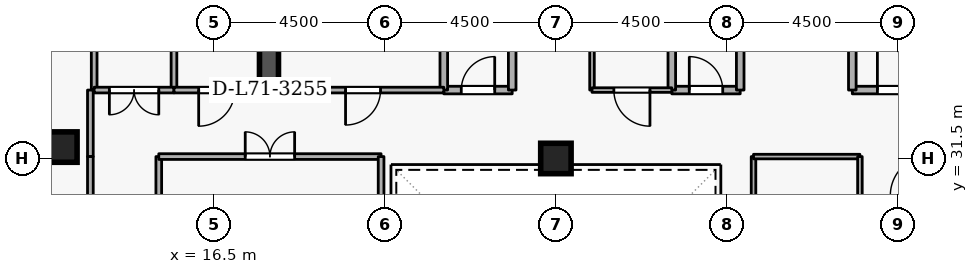
"""IFC4 building model, lengths in metres.
Left out: names, types, materials, properties, quantities, classifications, styles, units other than length and angle.
Written with IfcOpenShell. Run it as: python <this file> out.ifc"""

import sys

from ifc_helpers import new_model, si_unit, direction, frame, frame_2d, origin, origin_2d, place, context, subcontext, project, spatial, rectangle, extrude, element, fill, save


model = new_model("IFC4")
c1 = context("Model", 3, precision=1e-05, world=origin(), true_north=direction((0.0, 1.0)))
c2 = subcontext(c1, "Body", "Model", "MODEL_VIEW")
j1 = project(units=[si_unit("LENGTHUNIT", "METRE"), si_unit("PLANEANGLEUNIT", "RADIAN")], contexts=[c1])
p1 = place(None, origin())
s1 = spatial("IfcSite", under=j1, at=p1, CompositionType="ELEMENT")
p2 = place(p1, origin())
s2 = spatial("IfcBuilding", under=s1, at=p2, CompositionType="ELEMENT")
p3 = place(p2, frame((0.0, 0.0, 265.5)))
s3 = spatial("IfcBuildingStorey", under=s2, at=p3, CompositionType="ELEMENT", Elevation=265.5)
p4 = place(p3, frame((17.95, 33.1, 0.0), z_axis=(0.0, 0.0, 1.0), x_axis=(0.0, 1.0, 0.0)))
e1 = element("IfcWall", 1, at=p4, inside=s3, PredefinedType="SHEAR", context=c2, shape_type="SweptSolid", body=[
    extrude(rectangle(XDim=5.8, YDim=0.5, at=frame_2d((2.9, 0.0))), origin(), (0.0, 0.0, 1.0), 3.6),
])
for number, where, z_axis, x_axis in (
    (2, (12.5, 31.8, 0.0), (0.0, 0.0, 1.0), (1.0, 0.0, 0.0)),
    (3, (25.5, 31.5, 0.0), (0.0, 0.0, 1.0), (1.0, 0.0, 0.0)),
):
    element("IfcColumn", number, at=place(p3, frame(where, z_axis=z_axis, x_axis=x_axis)), inside=s3, PredefinedType="COLUMN", context=c2, shape_type="SweptSolid", body=[
        extrude(rectangle(XDim=0.8, YDim=0.8, at=origin_2d()), origin(), (0.0, 0.0, 1.0), 3.6),
    ])
p5 = place(p3, frame((33.3, 33.3, 0.0), z_axis=(0.0, 0.0, 1.0), x_axis=(1.0, 0.0, 0.0)))
e4 = element("IfcWall", 4, at=p5, inside=s3, PredefinedType="STANDARD", context=c2, shape_type="SweptSolid", body=[
    extrude(rectangle(XDim=2.5, YDim=0.2, at=frame_2d((1.25, 0.0))), origin(), (0.0, 0.0, 1.0), 3.34),
])
p6 = place(p5, frame((0.66, 0.0, 0.0)))
e5 = element("IfcOpeningElement", 5, at=p6, cuts=e4, PredefinedType="OPENING", context=c2, shape_type="SweptSolid", body=[
    extrude(rectangle(XDim=1.15, YDim=2.1, at=frame_2d((0.575, 1.05))), frame((0.0, 0.11, 0.0), z_axis=(0.0, -1.0, 0.0), x_axis=(1.0, 0.0, 0.0)), (0.0, 0.0, 1.0), 0.22),
])
p7 = place(p3, frame((33.3, 35.6, 0.0), z_axis=(0.0, 0.0, 1.0), x_axis=(0.0, -1.0, 0.0)))
e6 = element("IfcWall", 6, at=p7, inside=s3, PredefinedType="STANDARD", context=c2, shape_type="SweptSolid", body=[
    extrude(rectangle(XDim=2.3, YDim=0.2, at=frame_2d((1.15, 0.0))), origin(), (0.0, 0.0, 1.0), 2.545),
])
p8 = place(p3, frame((22.55, 33.3, 0.0), z_axis=(0.0, 0.0, 1.0), x_axis=(1.0, 0.0, 0.0)))
e7 = element("IfcWall", 7, at=p8, inside=s3, PredefinedType="STANDARD", context=c2, shape_type="SweptSolid", body=[
    extrude(rectangle(XDim=1.8, YDim=0.2, at=frame_2d((0.9, 0.0))), origin(), (0.0, 0.0, 1.0), 3.34),
])
p9 = place(p8, frame((0.46, 0.0, 0.0)))
e8 = element("IfcOpeningElement", 8, at=p9, cuts=e7, PredefinedType="OPENING", context=c2, shape_type="SweptSolid", body=[
    extrude(rectangle(XDim=0.88, YDim=2.04, at=frame_2d((0.44, 1.02))), frame((0.0, 0.11, 0.0), z_axis=(0.0, -1.0, 0.0), x_axis=(1.0, 0.0, 0.0)), (0.0, 0.0, 1.0), 0.22),
])
for number, where, z_axis, x_axis in (
    (9, (24.35, 33.3, 0.0), (0.0, 0.0, 1.0), (0.0, 1.0, 0.0)),
    (10, (22.55, 35.35, 0.0), (0.0, 0.0, 1.0), (0.0, -1.0, 0.0)),
):
    element("IfcWall", number, at=place(p3, frame(where, z_axis=z_axis, x_axis=x_axis)), inside=s3, PredefinedType="STANDARD", context=c2, shape_type="SweptSolid", body=[
        extrude(rectangle(XDim=2.05, YDim=0.2, at=frame_2d((1.025, 0.0))), origin(), (0.0, 0.0, 1.0), 3.34),
    ])
p10 = place(p3, frame((28.55, 33.3, 0.0), z_axis=(0.0, 0.0, 1.0), x_axis=(1.0, 0.0, 0.0)))
e11 = element("IfcWall", 11, at=p10, inside=s3, PredefinedType="STANDARD", context=c2, shape_type="SweptSolid", body=[
    extrude(rectangle(XDim=1.8, YDim=0.2, at=frame_2d((0.9, 0.0))), origin(), (0.0, 0.0, 1.0), 3.34),
])
p11 = place(p10, frame((0.46, 0.0, 0.0)))
e12 = element("IfcOpeningElement", 12, at=p11, cuts=e11, PredefinedType="OPENING", context=c2, shape_type="SweptSolid", body=[
    extrude(rectangle(XDim=0.88, YDim=2.04, at=frame_2d((0.44, 1.02))), frame((0.0, 0.11, 0.0), z_axis=(0.0, -1.0, 0.0), x_axis=(1.0, 0.0, 0.0)), (0.0, 0.0, 1.0), 0.22),
])
for number, where, z_axis, x_axis in (
    (13, (30.35, 33.3, 0.0), (0.0, 0.0, 1.0), (0.0, 1.0, 0.0)),
    (14, (28.55, 35.35, 0.0), (0.0, 0.0, 1.0), (0.0, -1.0, 0.0)),
):
    element("IfcWall", number, at=place(p3, frame(where, z_axis=z_axis, x_axis=x_axis)), inside=s3, PredefinedType="STANDARD", context=c2, shape_type="SweptSolid", body=[
        extrude(rectangle(XDim=2.05, YDim=0.2, at=frame_2d((1.025, 0.0))), origin(), (0.0, 0.0, 1.0), 3.34),
    ])
p12 = place(p3, frame((22.55, 33.3, 0.0), z_axis=(0.0, 0.0, 1.0), x_axis=(-1.0, 0.0, 0.0)))
e15 = element("IfcWall", 15, at=p12, inside=s3, PredefinedType="PARTITIONING", context=c2, shape_type="SweptSolid", body=[
    extrude(rectangle(XDim=4.25, YDim=0.15, at=frame_2d((2.125, 0.0))), origin(), (0.0, 0.0, 1.0), 3.34),
])
p13 = place(p12, frame((1.665, 0.0, 0.0)))
e16 = element("IfcOpeningElement", 16, at=p13, cuts=e15, PredefinedType="OPENING", context=c2, shape_type="SweptSolid", body=[
    extrude(rectangle(XDim=0.92, YDim=2.08, at=frame_2d((0.46, 1.04))), frame((0.0, 0.085, 0.0), z_axis=(0.0, -1.0, 0.0), x_axis=(1.0, 0.0, 0.0)), (0.0, 0.0, 1.0), 0.17),
])
p14 = place(p3, frame((26.45, 33.3, 0.0), z_axis=(0.0, 0.0, 1.0), x_axis=(0.0, 1.0, 0.0)))
e17 = element("IfcWall", 17, at=p14, inside=s3, PredefinedType="PARTITIONING", context=c2, shape_type="SweptSolid", body=[
    extrude(rectangle(XDim=2.05, YDim=0.12, at=frame_2d((1.025, 0.0))), origin(), (0.0, 0.0, 1.0), 3.34),
])
p15 = place(p3, frame((28.55, 33.3, 0.0), z_axis=(0.0, 0.0, 1.0), x_axis=(-1.0, 0.0, 0.0)))
e18 = element("IfcWall", 18, at=p15, inside=s3, PredefinedType="PARTITIONING", context=c2, shape_type="SweptSolid", body=[
    extrude(rectangle(XDim=2.1, YDim=0.12, at=frame_2d((1.05, 0.0))), origin(), (0.0, 0.0, 1.0), 3.34),
])
p16 = place(p15, frame((0.575, 0.0, 0.0)))
e19 = element("IfcOpeningElement", 19, at=p16, cuts=e18, PredefinedType="OPENING", context=c2, shape_type="SweptSolid", body=[
    extrude(rectangle(XDim=0.95, YDim=2.1, at=frame_2d((0.475, 1.05))), frame((0.0, 0.07, 0.0), z_axis=(0.0, -1.0, 0.0), x_axis=(1.0, 0.0, 0.0)), (0.0, 0.0, 1.0), 0.14),
])
for number, where, z_axis, x_axis in (
    (20, (13.35, 33.3, 0.0), (0.0, 0.0, 1.0), (0.0, 1.0, 0.0)),
    (21, (15.45, 44.72, 0.0), (0.0, 0.0, 1.0), (0.0, -1.0, 0.0)),
):
    element("IfcWall", number, at=place(p3, frame(where, z_axis=z_axis, x_axis=x_axis)), inside=s3, PredefinedType="PARTITIONING", context=c2, shape_type="SweptSolid", body=[
        extrude(rectangle(XDim=11.42, YDim=0.15, at=frame_2d((5.71, 0.0))), origin(), (0.0, 0.0, 1.0), 3.34),
    ])
p17 = place(p3, frame((15.45, 33.3, 0.0), z_axis=(0.0, 0.0, 1.0), x_axis=(-1.0, 0.0, 0.0)))
e22 = element("IfcWall", 22, at=p17, inside=s3, PredefinedType="PARTITIONING", context=c2, shape_type="SweptSolid", body=[
    extrude(rectangle(XDim=2.1, YDim=0.15, at=frame_2d((1.05, 0.0))), origin(), (0.0, 0.0, 1.0), 3.34),
])
p18 = place(p17, frame((0.4, 0.0, 0.0)))
e23 = element("IfcOpeningElement", 23, at=p18, cuts=e22, PredefinedType="OPENING", context=c2, shape_type="SweptSolid", body=[
    extrude(rectangle(XDim=1.3, YDim=2.12, at=frame_2d((0.65, 1.06))), frame((0.0, 0.085, 0.0), z_axis=(0.0, -1.0, 0.0), x_axis=(1.0, 0.0, 0.0)), (0.0, 0.0, 1.0), 0.17),
])
p19 = place(p3, frame((17.7, 33.3, 0.0), z_axis=(0.0, 0.0, 1.0), x_axis=(-1.0, 0.0, 0.0)))
e24 = element("IfcWall", 24, at=p19, inside=s3, PredefinedType="PARTITIONING", context=c2, shape_type="SweptSolid", body=[
    extrude(rectangle(XDim=2.25, YDim=0.15, at=frame_2d((1.125, 0.0))), origin(), (0.0, 0.0, 1.0), 3.34),
])
p20 = place(p19, frame((0.65, 0.0, 0.0)))
e25 = element("IfcOpeningElement", 25, at=p20, cuts=e24, PredefinedType="OPENING", context=c2, shape_type="SweptSolid", body=[
    extrude(rectangle(XDim=0.95, YDim=2.1, at=frame_2d((0.475, 1.05))), frame((0.0, 0.085, 0.0), z_axis=(0.0, -1.0, 0.0), x_axis=(1.0, 0.0, 0.0)), (0.0, 0.0, 1.0), 0.17),
])
p21 = place(p3, frame((13.25, 33.3, 0.0), z_axis=(0.0, 0.0, 1.0), x_axis=(0.0, -1.0, 0.0)))
e26 = element("IfcWall", 26, at=p21, inside=s3, PredefinedType="PARTITIONING", context=c2, shape_type="SweptSolid", body=[
    extrude(rectangle(XDim=1.75, YDim=0.15, at=frame_2d((0.875, 0.0))), origin(), (0.0, 0.0, 1.0), 3.34),
])
p22 = place(p3, frame((13.25, 31.55, 0.0), z_axis=(0.0, 0.0, 1.0), x_axis=(0.0, -1.0, 0.0)))
e27 = element("IfcWall", 27, at=p22, inside=s3, PredefinedType="PARTITIONING", context=c2, shape_type="SweptSolid", body=[
    extrude(rectangle(XDim=3.35, YDim=0.15, at=frame_2d((1.675, 0.0))), origin(), (0.0, 0.0, 1.0), 3.34),
])
p23 = place(p22, frame((1.025, 0.0, 0.0)))
e28 = element("IfcOpeningElement", 28, at=p23, cuts=e27, PredefinedType="OPENING", context=c2, shape_type="SweptSolid", body=[
    extrude(rectangle(XDim=1.3, YDim=2.12, at=frame_2d((0.65, 1.06))), frame((0.0, 0.085, 0.0), z_axis=(0.0, -1.0, 0.0), x_axis=(1.0, 0.0, 0.0)), (0.0, 0.0, 1.0), 0.17),
])
p24 = place(p3, frame((15.05, 28.2, 0.0), z_axis=(0.0, 0.0, 1.0), x_axis=(0.0, 1.0, 0.0)))
e29 = element("IfcWall", 29, at=p24, inside=s3, PredefinedType="PARTITIONING", context=c2, shape_type="SweptSolid", body=[
    extrude(rectangle(XDim=3.35, YDim=0.15, at=frame_2d((1.675, 0.0))), origin(), (0.0, 0.0, 1.0), 3.34),
])
p25 = place(p3, frame((15.05, 31.55, 0.0), z_axis=(0.0, 0.0, 1.0), x_axis=(1.0, 0.0, 0.0)))
e30 = element("IfcWall", 30, at=p25, inside=s3, PredefinedType="PARTITIONING", context=c2, shape_type="SweptSolid", body=[
    extrude(rectangle(XDim=5.85, YDim=0.15, at=frame_2d((2.925, 0.0))), origin(), (0.0, 0.0, 1.0), 3.34),
])
p26 = place(p25, frame((2.275, 0.0, 0.0)))
e31 = element("IfcOpeningElement", 31, at=p26, cuts=e30, PredefinedType="OPENING", context=c2, shape_type="SweptSolid", body=[
    extrude(rectangle(XDim=1.3, YDim=2.12, at=frame_2d((0.65, 1.06))), frame((0.0, 0.085, 0.0), z_axis=(0.0, -1.0, 0.0), x_axis=(1.0, 0.0, 0.0)), (0.0, 0.0, 1.0), 0.17),
])
p27 = place(p3, frame((20.9, 31.55, 0.0), z_axis=(0.0, 0.0, 1.0), x_axis=(0.0, -1.0, 0.0)))
e32 = element("IfcWall", 32, at=p27, inside=s3, PredefinedType="PARTITIONING", context=c2, shape_type="SweptSolid", body=[
    extrude(rectangle(XDim=3.35, YDim=0.15, at=frame_2d((1.675, 0.0))), origin(), (0.0, 0.0, 1.0), 3.34),
])
p28 = place(p3, frame((30.7, 27.0, 0.0), z_axis=(0.0, 0.0, 1.0), x_axis=(0.0, 1.0, 0.0)))
e33 = element("IfcWall", 33, at=p28, inside=s3, PredefinedType="PARTITIONING", context=c2, shape_type="SweptSolid", body=[
    extrude(rectangle(XDim=4.55, YDim=0.12, at=frame_2d((2.275, 0.0))), origin(), (0.0, 0.0, 1.0), 3.34),
])
p29 = place(p3, frame((30.7, 31.55, 0.0), z_axis=(0.0, 0.0, 1.0), x_axis=(1.0, 0.0, 0.0)))
e34 = element("IfcWall", 34, at=p29, inside=s3, PredefinedType="PARTITIONING", context=c2, shape_type="SweptSolid", body=[
    extrude(rectangle(XDim=2.8, YDim=0.12, at=frame_2d((1.4, 0.0))), origin(), (0.0, 0.0, 1.0), 3.34),
])
p30 = place(p3, frame((33.5, 31.55, 0.0), z_axis=(0.0, 0.0, 1.0), x_axis=(0.0, -1.0, 0.0)))
e35 = element("IfcWall", 35, at=p30, inside=s3, PredefinedType="PARTITIONING", context=c2, shape_type="SweptSolid", body=[
    extrude(rectangle(XDim=4.55, YDim=0.12, at=frame_2d((2.275, 0.0))), origin(), (0.0, 0.0, 1.0), 3.34),
])
p31 = place(p30, frame((1.8, 0.0, 0.0)))
e36 = element("IfcOpeningElement", 36, at=p31, cuts=e35, PredefinedType="OPENING", context=c2, shape_type="SweptSolid", body=[
    extrude(rectangle(XDim=0.95, YDim=2.1, at=frame_2d((0.475, 1.05))), frame((0.0, 0.07, 0.0), z_axis=(0.0, -1.0, 0.0), x_axis=(1.0, 0.0, 0.0)), (0.0, 0.0, 1.0), 0.14),
])
p32 = place(p6, origin())
e37 = element("IfcDoor", 37, at=p32, inside=s3, OperationType="SINGLE_SWING_LEFT", PredefinedType="DOOR", context=c2, shape_type="SweptSolid", body=[
    extrude(rectangle(XDim=1.15, YDim=2.1, at=frame_2d((0.575, 1.05))), frame((0.0, 0.025, 0.0), z_axis=(0.0, -1.0, 0.0), x_axis=(1.0, 0.0, 0.0)), (0.0, 0.0, 1.0), 0.05),
])
fill(e5, e37)
p33 = place(p9, origin())
e38 = element("IfcDoor", 38, at=p33, inside=s3, OperationType="SINGLE_SWING_RIGHT", PredefinedType="DOOR", context=c2, shape_type="SweptSolid", body=[
    extrude(rectangle(XDim=0.88, YDim=2.04, at=frame_2d((0.44, 1.02))), frame((0.0, 0.025, 0.0), z_axis=(0.0, -1.0, 0.0), x_axis=(1.0, 0.0, 0.0)), (0.0, 0.0, 1.0), 0.05),
])
fill(e8, e38)
p34 = place(p11, origin())
e39 = element("IfcDoor", 39, at=p34, inside=s3, OperationType="SINGLE_SWING_LEFT", PredefinedType="DOOR", context=c2, shape_type="SweptSolid", body=[
    extrude(rectangle(XDim=0.88, YDim=2.04, at=frame_2d((0.44, 1.02))), frame((0.0, 0.025, 0.0), z_axis=(0.0, -1.0, 0.0), x_axis=(1.0, 0.0, 0.0)), (0.0, 0.0, 1.0), 0.05),
])
fill(e12, e39)
p35 = place(p13, origin())
e40 = element("IfcDoor", 40, at=p35, inside=s3, OperationType="SINGLE_SWING_RIGHT", PredefinedType="DOOR", context=c2, shape_type="SweptSolid", body=[
    extrude(rectangle(XDim=0.92, YDim=2.08, at=frame_2d((0.46, 1.04))), frame((0.0, 0.025, 0.0), z_axis=(0.0, -1.0, 0.0), x_axis=(1.0, 0.0, 0.0)), (0.0, 0.0, 1.0), 0.05),
])
fill(e16, e40)
p36 = place(p16, origin())
e41 = element("IfcDoor", 41, at=p36, inside=s3, OperationType="SINGLE_SWING_LEFT", PredefinedType="DOOR", context=c2, shape_type="SweptSolid", body=[
    extrude(rectangle(XDim=0.95, YDim=2.1, at=frame_2d((0.475, 1.05))), frame((0.0, 0.025, 0.0), z_axis=(0.0, -1.0, 0.0), x_axis=(1.0, 0.0, 0.0)), (0.0, 0.0, 1.0), 0.05),
])
fill(e19, e41)
p37 = place(p18, origin())
e42 = element("IfcDoor", 42, at=p37, inside=s3, OperationType="DOUBLE_DOOR_SINGLE_SWING", PredefinedType="DOOR", context=c2, shape_type="SweptSolid", body=[
    extrude(rectangle(XDim=1.3, YDim=2.12, at=frame_2d((0.65, 1.06))), frame((0.0, 0.025, 0.0), z_axis=(0.0, -1.0, 0.0), x_axis=(1.0, 0.0, 0.0)), (0.0, 0.0, 1.0), 0.05),
])
fill(e23, e42)
p38 = place(p20, origin())
e43 = element("IfcDoor", 43, at=p38, inside=s3, OperationType="SINGLE_SWING_RIGHT", PredefinedType="DOOR", context=c2, shape_type="SweptSolid", body=[
    extrude(rectangle(XDim=0.95, YDim=2.1, at=frame_2d((0.475, 1.05))), frame((0.0, 0.025, 0.0), z_axis=(0.0, -1.0, 0.0), x_axis=(1.0, 0.0, 0.0)), (0.0, 0.0, 1.0), 0.05),
])
fill(e25, e43)
p39 = place(p26, origin())
e44 = element("IfcDoor", 44, at=p39, inside=s3, OperationType="DOUBLE_DOOR_SINGLE_SWING", PredefinedType="DOOR", context=c2, shape_type="SweptSolid", body=[
    extrude(rectangle(XDim=1.3, YDim=2.12, at=frame_2d((0.65, 1.06))), frame((0.0, 0.025, 0.0), z_axis=(0.0, -1.0, 0.0), x_axis=(1.0, 0.0, 0.0)), (0.0, 0.0, 1.0), 0.05),
])
fill(e31, e44)
save(model, sys.argv[1])
